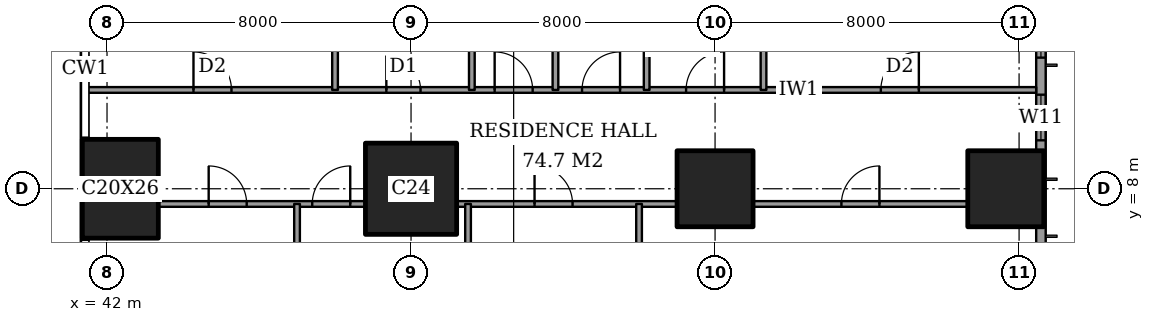
"""IFC4 building model, lengths in metres.
Left out: names, types, materials, properties, quantities, classifications, styles, units other than length and angle.
Written with IfcOpenShell. Run it as: python <this file> out.ifc"""

import sys

from ifc_helpers import new_model, si_unit, direction, frame, frame_2d, origin, origin_2d, place, context, subcontext, project, spatial, rectangle, extrude, element, fill, save


model = new_model("IFC4")
c1 = context("Model", 3, precision=1e-05, world=origin(), true_north=direction((0.0, 1.0)))
c2 = subcontext(c1, "Body", "Model", "MODEL_VIEW")
j1 = project(units=[si_unit("LENGTHUNIT", "METRE"), si_unit("PLANEANGLEUNIT", "RADIAN")], contexts=[c1])
p1 = place(None, origin())
s1 = spatial("IfcSite", under=j1, at=p1, CompositionType="ELEMENT")
p2 = place(p1, origin())
s2 = spatial("IfcBuilding", under=s1, at=p2, CompositionType="ELEMENT")
p3 = place(p2, frame((0.0, 0.0, 96.2)))
s3 = spatial("IfcBuildingStorey", under=s2, at=p3, CompositionType="ELEMENT", Elevation=96.2)
p4 = place(p3, frame((42.35, 8.0, 0.0), z_axis=(0.0, 0.0, 1.0), x_axis=(1.0, 0.0, 0.0)))
e1 = element("IfcColumn", 1, at=p4, inside=s3, PredefinedType="COLUMN", context=c2, shape_type="SweptSolid", body=[
    extrude(rectangle(XDim=2.0, YDim=2.6, at=origin_2d()), origin(), (0.0, 0.0, 1.0), 3.6),
])
p5 = place(p3, frame((50.0, 8.0, 0.0), z_axis=(0.0, 0.0, 1.0), x_axis=(1.0, 0.0, 0.0)))
e2 = element("IfcColumn", 2, at=p5, inside=s3, PredefinedType="COLUMN", context=c2, shape_type="SweptSolid", body=[
    extrude(rectangle(XDim=2.4, YDim=2.4, at=origin_2d()), origin(), (0.0, 0.0, 1.0), 3.6),
])
for number, where, z_axis, x_axis in (
    (3, (58.0, 8.0, 0.0), (0.0, 0.0, 1.0), (1.0, 0.0, 0.0)),
    (4, (65.65, 8.0, 0.0), (0.0, 0.0, 1.0), (1.0, 0.0, 0.0)),
):
    element("IfcColumn", number, at=place(p3, frame(where, z_axis=z_axis, x_axis=x_axis)), inside=s3, PredefinedType="COLUMN", context=c2, shape_type="SweptSolid", body=[
        extrude(rectangle(XDim=2.0, YDim=2.0, at=origin_2d()), origin(), (0.0, 0.0, 1.0), 3.6),
    ])
p6 = place(p3, frame((66.575, 3.175, 0.0), z_axis=(0.0, 0.0, 1.0), x_axis=(0.0, 1.0, 0.0)))
e5 = element("IfcWall", 5, at=p6, inside=s3, PredefinedType="SOLIDWALL", context=c2, shape_type="SweptSolid", body=[
    extrude(rectangle(XDim=41.65, YDim=0.25, at=frame_2d((20.825, 0.0))), origin(), (0.0, 0.0, 1.0), 3.6),
])
p7 = place(p6, frame((0.775, 0.0, 0.4)))
e6 = element("IfcOpeningElement", 6, at=p7, cuts=e5, PredefinedType="OPENING", context=c2, shape_type="SweptSolid", body=[
    extrude(rectangle(XDim=2.4, YDim=2.2, at=frame_2d((1.2, 1.1))), frame((0.0, 0.135, 0.0), z_axis=(0.0, -1.0, 0.0), x_axis=(1.0, 0.0, 0.0)), (0.0, 0.0, 1.0), 0.27),
])
p8 = place(p6, frame((6.1, 0.0, 0.4)))
e7 = element("IfcOpeningElement", 7, at=p8, cuts=e5, PredefinedType="OPENING", context=c2, shape_type="SweptSolid", body=[
    extrude(rectangle(XDim=1.2, YDim=2.2, at=frame_2d((0.6, 1.1))), frame((0.0, 0.135, 0.0), z_axis=(0.0, -1.0, 0.0), x_axis=(1.0, 0.0, 0.0)), (0.0, 0.0, 1.0), 0.27),
])
p9 = place(p6, frame((8.275, 0.0, 0.4)))
e8 = element("IfcOpeningElement", 8, at=p9, cuts=e5, PredefinedType="OPENING", context=c2, shape_type="SweptSolid", body=[
    extrude(rectangle(XDim=2.4, YDim=2.2, at=frame_2d((1.2, 1.1))), frame((0.0, 0.135, 0.0), z_axis=(0.0, -1.0, 0.0), x_axis=(1.0, 0.0, 0.0)), (0.0, 0.0, 1.0), 0.27),
])
p10 = place(p6, frame((15.775, 0.0, 0.4)))
e9 = element("IfcOpeningElement", 9, at=p10, cuts=e5, PredefinedType="OPENING", context=c2, shape_type="SweptSolid", body=[
    extrude(rectangle(XDim=2.4, YDim=2.2, at=frame_2d((1.2, 1.1))), frame((0.0, 0.135, 0.0), z_axis=(0.0, -1.0, 0.0), x_axis=(1.0, 0.0, 0.0)), (0.0, 0.0, 1.0), 0.27),
])
p11 = place(p6, frame((23.475, 0.0, 0.4)))
e10 = element("IfcOpeningElement", 10, at=p11, cuts=e5, PredefinedType="OPENING", context=c2, shape_type="SweptSolid", body=[
    extrude(rectangle(XDim=2.4, YDim=2.2, at=frame_2d((1.2, 1.1))), frame((0.0, 0.135, 0.0), z_axis=(0.0, -1.0, 0.0), x_axis=(1.0, 0.0, 0.0)), (0.0, 0.0, 1.0), 0.27),
])
p12 = place(p6, frame((30.975, 0.0, 0.4)))
e11 = element("IfcOpeningElement", 11, at=p12, cuts=e5, PredefinedType="OPENING", context=c2, shape_type="SweptSolid", body=[
    extrude(rectangle(XDim=2.4, YDim=2.2, at=frame_2d((1.2, 1.1))), frame((0.0, 0.135, 0.0), z_axis=(0.0, -1.0, 0.0), x_axis=(1.0, 0.0, 0.0)), (0.0, 0.0, 1.0), 0.27),
])
p13 = place(p6, frame((34.5, 0.0, 0.4)))
e12 = element("IfcOpeningElement", 12, at=p13, cuts=e5, PredefinedType="OPENING", context=c2, shape_type="SweptSolid", body=[
    extrude(rectangle(XDim=1.2, YDim=2.2, at=frame_2d((0.6, 1.1))), frame((0.0, 0.135, 0.0), z_axis=(0.0, -1.0, 0.0), x_axis=(1.0, 0.0, 0.0)), (0.0, 0.0, 1.0), 0.27),
])
p14 = place(p6, frame((38.475, 0.0, 0.4)))
e13 = element("IfcOpeningElement", 13, at=p14, cuts=e5, PredefinedType="OPENING", context=c2, shape_type="SweptSolid", body=[
    extrude(rectangle(XDim=2.4, YDim=2.2, at=frame_2d((1.2, 1.1))), frame((0.0, 0.135, 0.0), z_axis=(0.0, -1.0, 0.0), x_axis=(1.0, 0.0, 0.0)), (0.0, 0.0, 1.0), 0.27),
])
p15 = place(p3, frame((43.35, 7.6, 0.0), z_axis=(0.0, 0.0, 1.0), x_axis=(1.0, 0.0, 0.0)))
e14 = element("IfcWall", 14, at=p15, inside=s3, PredefinedType="PARTITIONING", context=c2, shape_type="SweptSolid", body=[
    extrude(rectangle(XDim=5.45, YDim=0.15, at=frame_2d((2.725, 0.0))), origin(), (0.0, 0.0, 1.0), 3.35),
])
p16 = place(p15, frame((4.05, 0.0, 0.0)))
e15 = element("IfcOpeningElement", 15, at=p16, cuts=e14, PredefinedType="OPENING", context=c2, shape_type="SweptSolid", body=[
    extrude(rectangle(XDim=1.0, YDim=2.1, at=frame_2d((0.5, 1.05))), frame((0.0, 0.085, 0.0), z_axis=(0.0, -1.0, 0.0), x_axis=(1.0, 0.0, 0.0)), (0.0, 0.0, 1.0), 0.17),
])
p17 = place(p15, frame((1.325, 0.0, 0.0)))
e16 = element("IfcOpeningElement", 16, at=p17, cuts=e14, PredefinedType="OPENING", context=c2, shape_type="SweptSolid", body=[
    extrude(rectangle(XDim=1.0, YDim=2.1, at=frame_2d((0.5, 1.05))), frame((0.0, 0.085, 0.0), z_axis=(0.0, -1.0, 0.0), x_axis=(1.0, 0.0, 0.0)), (0.0, 0.0, 1.0), 0.17),
])
p18 = place(p3, frame((51.2, 7.6, 0.0), z_axis=(0.0, 0.0, 1.0), x_axis=(1.0, 0.0, 0.0)))
e17 = element("IfcWall", 17, at=p18, inside=s3, PredefinedType="PARTITIONING", context=c2, shape_type="SweptSolid", body=[
    extrude(rectangle(XDim=5.8, YDim=0.15, at=frame_2d((2.9, 0.0))), origin(), (0.0, 0.0, 1.0), 3.35),
])
p19 = place(p18, frame((2.05, 0.0, 0.0)))
e18 = element("IfcOpeningElement", 18, at=p19, cuts=e17, PredefinedType="OPENING", context=c2, shape_type="SweptSolid", body=[
    extrude(rectangle(XDim=1.0, YDim=2.1, at=frame_2d((0.5, 1.05))), frame((0.0, 0.085, 0.0), z_axis=(0.0, -1.0, 0.0), x_axis=(1.0, 0.0, 0.0)), (0.0, 0.0, 1.0), 0.17),
])
p20 = place(p3, frame((59.0, 7.6, 0.0), z_axis=(0.0, 0.0, 1.0), x_axis=(1.0, 0.0, 0.0)))
e19 = element("IfcWall", 19, at=p20, inside=s3, PredefinedType="PARTITIONING", context=c2, shape_type="SweptSolid", body=[
    extrude(rectangle(XDim=5.65, YDim=0.15, at=frame_2d((2.825, 0.0))), origin(), (0.0, 0.0, 1.0), 3.35),
])
p21 = place(p20, frame((2.325, 0.0, 0.0)))
e20 = element("IfcOpeningElement", 20, at=p21, cuts=e19, PredefinedType="OPENING", context=c2, shape_type="SweptSolid", body=[
    extrude(rectangle(XDim=1.0, YDim=2.1, at=frame_2d((0.5, 1.05))), frame((0.0, 0.085, 0.0), z_axis=(0.0, -1.0, 0.0), x_axis=(1.0, 0.0, 0.0)), (0.0, 0.0, 1.0), 0.17),
])
p22 = place(p3, frame((41.439, 10.6, 0.0), z_axis=(0.0, 0.0, 1.0), x_axis=(1.0, 0.0, 0.0)))
e21 = element("IfcWall", 21, at=p22, inside=s3, PredefinedType="PARTITIONING", context=c2, shape_type="SweptSolid", body=[
    extrude(rectangle(XDim=25.011, YDim=0.15, at=frame_2d((12.505, 0.0))), origin(), (0.0, 0.0, 1.0), 3.35),
])
p23 = place(p22, frame((10.761, 0.0, 0.0)))
e22 = element("IfcOpeningElement", 22, at=p23, cuts=e21, PredefinedType="OPENING", context=c2, shape_type="SweptSolid", body=[
    extrude(rectangle(XDim=1.0, YDim=2.1, at=frame_2d((0.5, 1.05))), frame((0.0, 0.085, 0.0), z_axis=(0.0, -1.0, 0.0), x_axis=(1.0, 0.0, 0.0)), (0.0, 0.0, 1.0), 0.17),
])
p24 = place(p22, frame((20.924, 0.0, 0.0)))
e23 = element("IfcOpeningElement", 23, at=p24, cuts=e21, PredefinedType="OPENING", context=c2, shape_type="SweptSolid", body=[
    extrude(rectangle(XDim=1.0, YDim=2.1, at=frame_2d((0.5, 1.05))), frame((0.0, 0.085, 0.0), z_axis=(0.0, -1.0, 0.0), x_axis=(1.0, 0.0, 0.0)), (0.0, 0.0, 1.0), 0.17),
])
p25 = place(p22, frame((15.799, 0.0, 0.0)))
e24 = element("IfcOpeningElement", 24, at=p25, cuts=e21, PredefinedType="OPENING", context=c2, shape_type="SweptSolid", body=[
    extrude(rectangle(XDim=1.0, YDim=2.1, at=frame_2d((0.5, 1.05))), frame((0.0, 0.085, 0.0), z_axis=(0.0, -1.0, 0.0), x_axis=(1.0, 0.0, 0.0)), (0.0, 0.0, 1.0), 0.17),
])
p26 = place(p22, frame((13.061, 0.0, 0.0)))
e25 = element("IfcOpeningElement", 25, at=p26, cuts=e21, PredefinedType="OPENING", context=c2, shape_type="SweptSolid", body=[
    extrude(rectangle(XDim=1.0, YDim=2.1, at=frame_2d((0.5, 1.05))), frame((0.0, 0.085, 0.0), z_axis=(0.0, -1.0, 0.0), x_axis=(1.0, 0.0, 0.0)), (0.0, 0.0, 1.0), 0.17),
])
p27 = place(p22, frame((7.911, 0.0, 0.0)))
e26 = element("IfcOpeningElement", 26, at=p27, cuts=e21, PredefinedType="OPENING", context=c2, shape_type="SweptSolid", body=[
    extrude(rectangle(XDim=0.9, YDim=2.1, at=frame_2d((0.45, 1.05))), frame((0.0, 0.085, 0.0), z_axis=(0.0, -1.0, 0.0), x_axis=(1.0, 0.0, 0.0)), (0.0, 0.0, 1.0), 0.17),
])
p28 = place(p22, frame((2.836, 0.0, 0.0)))
e27 = element("IfcOpeningElement", 27, at=p28, cuts=e21, PredefinedType="OPENING", context=c2, shape_type="SweptSolid", body=[
    extrude(rectangle(XDim=1.0, YDim=2.1, at=frame_2d((0.5, 1.05))), frame((0.0, 0.085, 0.0), z_axis=(0.0, -1.0, 0.0), x_axis=(1.0, 0.0, 0.0)), (0.0, 0.0, 1.0), 0.17),
])
p29 = place(p3, frame((47.0, -0.45, 0.0), z_axis=(0.0, 0.0, 1.0), x_axis=(0.0, 1.0, 0.0)))
e28 = element("IfcWall", 28, at=p29, inside=s3, PredefinedType="PARTITIONING", context=c2, shape_type="SweptSolid", body=[
    extrude(rectangle(XDim=8.05, YDim=0.15, at=frame_2d((4.025, 0.0))), origin(), (0.0, 0.0, 1.0), 3.35),
])
p30 = place(p3, frame((48.0, 10.6, 0.0), z_axis=(0.0, 0.0, 1.0), x_axis=(0.0, 1.0, 0.0)))
e29 = element("IfcWall", 29, at=p30, inside=s3, PredefinedType="PARTITIONING", context=c2, shape_type="SweptSolid", body=[
    extrude(rectangle(XDim=13.4, YDim=0.15, at=frame_2d((6.7, 0.0))), origin(), (0.0, 0.0, 1.0), 3.35),
])
p31 = place(p30, frame((10.8, 0.0, 0.0)))
e30 = element("IfcOpeningElement", 30, at=p31, cuts=e29, PredefinedType="OPENING", context=c2, shape_type="SweptSolid", body=[
    extrude(rectangle(XDim=1.2, YDim=2.4, at=frame_2d((0.6, 1.2))), frame((0.0, 0.085, 0.0), z_axis=(0.0, -1.0, 0.0), x_axis=(1.0, 0.0, 0.0)), (0.0, 0.0, 1.0), 0.17),
])
p32 = place(p30, frame((6.7, 0.0, 0.0)))
e31 = element("IfcOpeningElement", 31, at=p32, cuts=e29, PredefinedType="OPENING", context=c2, shape_type="SweptSolid", body=[
    extrude(rectangle(XDim=0.9, YDim=2.1, at=frame_2d((0.45, 1.05))), frame((0.0, 0.085, 0.0), z_axis=(0.0, -1.0, 0.0), x_axis=(1.0, 0.0, 0.0)), (0.0, 0.0, 1.0), 0.17),
])
p33 = place(p3, frame((51.5, -0.45, 0.0), z_axis=(0.0, 0.0, 1.0), x_axis=(0.0, 1.0, 0.0)))
e32 = element("IfcWall", 32, at=p33, inside=s3, PredefinedType="PARTITIONING", context=c2, shape_type="SweptSolid", body=[
    extrude(rectangle(XDim=8.05, YDim=0.15, at=frame_2d((4.025, 0.0))), origin(), (0.0, 0.0, 1.0), 3.35),
])
for number, where, z_axis, x_axis in (
    (33, (51.6, 10.6, 0.0), (0.0, 0.0, 1.0), (0.0, 1.0, 0.0)),
    (34, (53.8, 10.6, 0.0), (0.0, 0.0, 1.0), (0.0, 1.0, 0.0)),
):
    element("IfcWall", number, at=place(p3, frame(where, z_axis=z_axis, x_axis=x_axis)), inside=s3, PredefinedType="PARTITIONING", context=c2, shape_type="SweptSolid", body=[
        extrude(rectangle(XDim=4.0, YDim=0.15, at=frame_2d((2.0, 0.0))), origin(), (0.0, 0.0, 1.0), 3.35),
    ])
p34 = place(p3, frame((56.0, -0.45, 0.0), z_axis=(0.0, 0.0, 1.0), x_axis=(0.0, 1.0, 0.0)))
e35 = element("IfcWall", 35, at=p34, inside=s3, PredefinedType="PARTITIONING", context=c2, shape_type="SweptSolid", body=[
    extrude(rectangle(XDim=8.05, YDim=0.15, at=frame_2d((4.025, 0.0))), origin(), (0.0, 0.0, 1.0), 3.35),
])
p35 = place(p3, frame((56.2, 10.6, 0.0), z_axis=(0.0, 0.0, 1.0), x_axis=(0.0, 1.0, 0.0)))
e36 = element("IfcWall", 36, at=p35, inside=s3, PredefinedType="PARTITIONING", context=c2, shape_type="SweptSolid", body=[
    extrude(rectangle(XDim=11.0, YDim=0.15, at=frame_2d((5.5, 0.0))), origin(), (0.0, 0.0, 1.0), 3.35),
])
p36 = place(p35, frame((7.0, 0.0, 0.0)))
e37 = element("IfcOpeningElement", 37, at=p36, cuts=e36, PredefinedType="OPENING", context=c2, shape_type="SweptSolid", body=[
    extrude(rectangle(XDim=1.0, YDim=2.1, at=frame_2d((0.5, 1.05))), frame((0.0, 0.085, 0.0), z_axis=(0.0, -1.0, 0.0), x_axis=(1.0, 0.0, 0.0)), (0.0, 0.0, 1.0), 0.17),
])
p37 = place(p3, frame((59.275, 10.6, 0.0), z_axis=(0.0, 0.0, 1.0), x_axis=(0.0, 1.0, 0.0)))
e38 = element("IfcWall", 38, at=p37, inside=s3, PredefinedType="PARTITIONING", context=c2, shape_type="SweptSolid", body=[
    extrude(rectangle(XDim=4.2, YDim=0.15, at=frame_2d((2.1, 0.0))), origin(), (0.0, 0.0, 1.0), 3.35),
])
p38 = place(p8, origin())
e39 = element("IfcWindow", 39, at=p38, inside=s3, PartitioningType="SINGLE_PANEL", PredefinedType="WINDOW", context=c2, shape_type="SweptSolid", body=[
    extrude(rectangle(XDim=1.2, YDim=2.2, at=frame_2d((0.6, 1.1))), frame((0.0, 0.03, 0.0), z_axis=(0.0, -1.0, 0.0), x_axis=(1.0, 0.0, 0.0)), (0.0, 0.0, 1.0), 0.06),
])
fill(e7, e39)
p39 = place(p9, origin())
e40 = element("IfcWindow", 40, at=p39, inside=s3, PartitioningType="SINGLE_PANEL", PredefinedType="WINDOW", context=c2, shape_type="SweptSolid", body=[
    extrude(rectangle(XDim=2.4, YDim=2.2, at=frame_2d((1.2, 1.1))), frame((0.0, 0.03, 0.0), z_axis=(0.0, -1.0, 0.0), x_axis=(1.0, 0.0, 0.0)), (0.0, 0.0, 1.0), 0.06),
])
fill(e8, e40)
p40 = place(p21, origin())
e41 = element("IfcDoor", 41, at=p40, inside=s3, OperationType="SINGLE_SWING_LEFT", PredefinedType="DOOR", context=c2, shape_type="SweptSolid", body=[
    extrude(rectangle(XDim=1.0, YDim=2.1, at=frame_2d((0.5, 1.05))), frame((0.0, 0.025, 0.0), z_axis=(0.0, -1.0, 0.0), x_axis=(1.0, 0.0, 0.0)), (0.0, 0.0, 1.0), 0.05),
])
fill(e20, e41)
p41 = place(p19, origin())
e42 = element("IfcDoor", 42, at=p41, inside=s3, OperationType="SINGLE_SWING_RIGHT", PredefinedType="DOOR", context=c2, shape_type="SweptSolid", body=[
    extrude(rectangle(XDim=1.0, YDim=2.1, at=frame_2d((0.5, 1.05))), frame((0.0, 0.025, 0.0), z_axis=(0.0, -1.0, 0.0), x_axis=(1.0, 0.0, 0.0)), (0.0, 0.0, 1.0), 0.05),
])
fill(e18, e42)
p42 = place(p16, origin())
e43 = element("IfcDoor", 43, at=p42, inside=s3, OperationType="SINGLE_SWING_LEFT", PredefinedType="DOOR", context=c2, shape_type="SweptSolid", body=[
    extrude(rectangle(XDim=1.0, YDim=2.1, at=frame_2d((0.5, 1.05))), frame((0.0, 0.025, 0.0), z_axis=(0.0, -1.0, 0.0), x_axis=(1.0, 0.0, 0.0)), (0.0, 0.0, 1.0), 0.05),
])
fill(e15, e43)
p43 = place(p17, origin())
e44 = element("IfcDoor", 44, at=p43, inside=s3, OperationType="SINGLE_SWING_RIGHT", PredefinedType="DOOR", context=c2, shape_type="SweptSolid", body=[
    extrude(rectangle(XDim=1.0, YDim=2.1, at=frame_2d((0.5, 1.05))), frame((0.0, 0.025, 0.0), z_axis=(0.0, -1.0, 0.0), x_axis=(1.0, 0.0, 0.0)), (0.0, 0.0, 1.0), 0.05),
])
fill(e16, e44)
p44 = place(p23, origin())
e45 = element("IfcDoor", 45, at=p44, inside=s3, OperationType="SINGLE_SWING_RIGHT", PredefinedType="DOOR", context=c2, shape_type="SweptSolid", body=[
    extrude(rectangle(XDim=1.0, YDim=2.1, at=frame_2d((0.5, 1.05))), frame((0.0, 0.025, 0.0), z_axis=(0.0, -1.0, 0.0), x_axis=(1.0, 0.0, 0.0)), (0.0, 0.0, 1.0), 0.05),
])
fill(e22, e45)
p45 = place(p24, origin())
e46 = element("IfcDoor", 46, at=p45, inside=s3, OperationType="SINGLE_SWING_LEFT", PredefinedType="DOOR", context=c2, shape_type="SweptSolid", body=[
    extrude(rectangle(XDim=1.0, YDim=2.1, at=frame_2d((0.5, 1.05))), frame((0.0, 0.025, 0.0), z_axis=(0.0, -1.0, 0.0), x_axis=(1.0, 0.0, 0.0)), (0.0, 0.0, 1.0), 0.05),
])
fill(e23, e46)
p46 = place(p25, origin())
e47 = element("IfcDoor", 47, at=p46, inside=s3, OperationType="SINGLE_SWING_LEFT", PredefinedType="DOOR", context=c2, shape_type="SweptSolid", body=[
    extrude(rectangle(XDim=1.0, YDim=2.1, at=frame_2d((0.5, 1.05))), frame((0.0, 0.025, 0.0), z_axis=(0.0, -1.0, 0.0), x_axis=(1.0, 0.0, 0.0)), (0.0, 0.0, 1.0), 0.05),
])
fill(e24, e47)
p47 = place(p26, origin())
e48 = element("IfcDoor", 48, at=p47, inside=s3, OperationType="SINGLE_SWING_LEFT", PredefinedType="DOOR", context=c2, shape_type="SweptSolid", body=[
    extrude(rectangle(XDim=1.0, YDim=2.1, at=frame_2d((0.5, 1.05))), frame((0.0, 0.025, 0.0), z_axis=(0.0, -1.0, 0.0), x_axis=(1.0, 0.0, 0.0)), (0.0, 0.0, 1.0), 0.05),
])
fill(e25, e48)
p48 = place(p27, origin())
e49 = element("IfcDoor", 49, at=p48, inside=s3, OperationType="SINGLE_SWING_RIGHT", PredefinedType="DOOR", context=c2, shape_type="SweptSolid", body=[
    extrude(rectangle(XDim=0.9, YDim=2.1, at=frame_2d((0.45, 1.05))), frame((0.0, 0.025, 0.0), z_axis=(0.0, -1.0, 0.0), x_axis=(1.0, 0.0, 0.0)), (0.0, 0.0, 1.0), 0.05),
])
fill(e26, e49)
p49 = place(p28, origin())
e50 = element("IfcDoor", 50, at=p49, inside=s3, OperationType="SINGLE_SWING_RIGHT", PredefinedType="DOOR", context=c2, shape_type="SweptSolid", body=[
    extrude(rectangle(XDim=1.0, YDim=2.1, at=frame_2d((0.5, 1.05))), frame((0.0, 0.025, 0.0), z_axis=(0.0, -1.0, 0.0), x_axis=(1.0, 0.0, 0.0)), (0.0, 0.0, 1.0), 0.05),
])
fill(e27, e50)
save(model, sys.argv[1])
